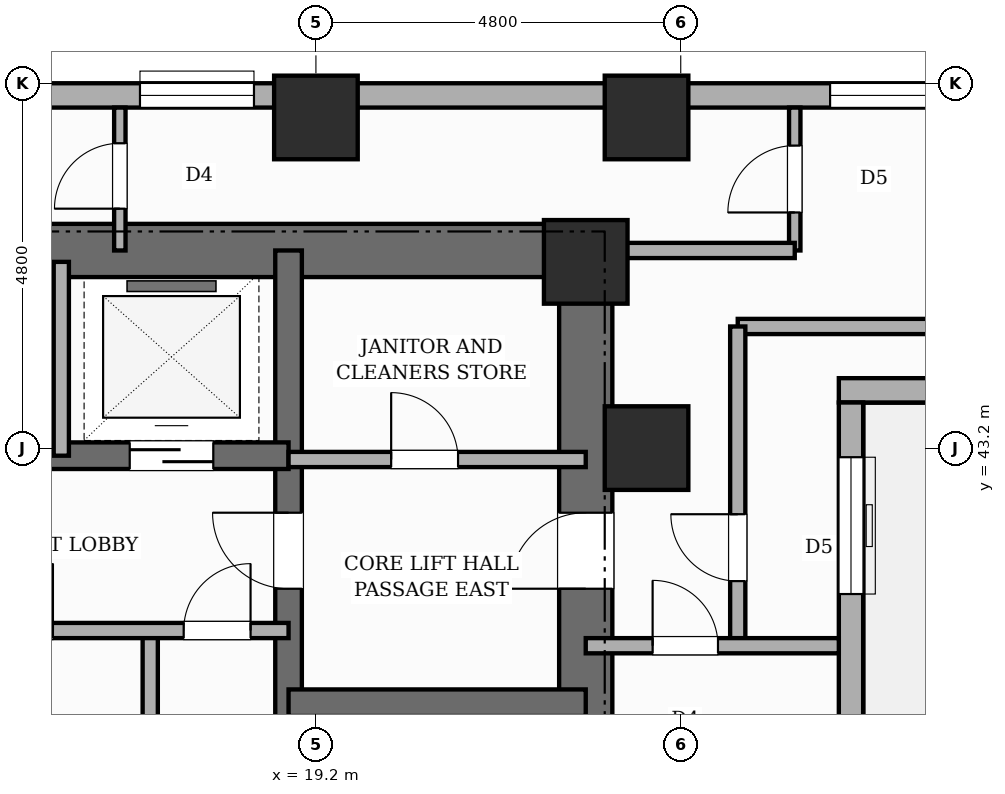
"""IFC4 building model, lengths in metres.
Left out: names, types, materials, properties, quantities, classifications, styles, units other than length and angle.
Written with IfcOpenShell. Run it as: python <this file> out.ifc"""

import sys

from ifc_helpers import new_model, si_unit, direction, frame, frame_2d, origin, origin_2d, place, context, subcontext, project, spatial, rectangle, extrude, element, fill, save


model = new_model("IFC4")
c1 = context("Model", 3, precision=1e-05, world=origin(), true_north=direction((0.0, 1.0)))
c2 = subcontext(c1, "Body", "Model", "MODEL_VIEW")
j1 = project(units=[si_unit("LENGTHUNIT", "METRE"), si_unit("PLANEANGLEUNIT", "RADIAN")], contexts=[c1])
p1 = place(None, origin())
s1 = spatial("IfcSite", under=j1, at=p1, CompositionType="ELEMENT")
p2 = place(p1, origin())
s2 = spatial("IfcBuilding", under=s1, at=p2, CompositionType="ELEMENT")
p3 = place(p2, frame((0.0, 0.0, 97.0)))
s3 = spatial("IfcBuildingStorey", under=s2, at=p3, CompositionType="ELEMENT", Elevation=97.0)
p4 = place(p3, frame((22.75, 30.55, 0.0), z_axis=(0.0, 0.0, 1.0), x_axis=(0.0, 1.0, 0.0)))
e1 = element("IfcWall", 1, at=p4, inside=s3, PredefinedType="SHEAR", context=c2, shape_type="SweptSolid", body=[
    extrude(rectangle(XDim=15.6, YDim=0.7, at=frame_2d((7.8, 0.0))), origin(), (0.0, 0.0, 1.0), 4.8),
])
p5 = place(p4, frame((10.8, 0.0, 0.0)))
e2 = element("IfcOpeningElement", 2, at=p5, cuts=e1, PredefinedType="OPENING", context=c2, shape_type="SweptSolid", body=[
    extrude(rectangle(XDim=1.0, YDim=2.15, at=frame_2d((0.5, 1.075))), frame((0.0, 0.36, 0.0), z_axis=(0.0, -1.0, 0.0), x_axis=(1.0, 0.0, 0.0)), (0.0, 0.0, 1.0), 0.72),
])
p6 = place(p3, frame((6.05, 45.8, 0.0), z_axis=(0.0, 0.0, 1.0), x_axis=(1.0, 0.0, 0.0)))
e3 = element("IfcWall", 3, at=p6, inside=s3, PredefinedType="SHEAR", context=c2, shape_type="SweptSolid", body=[
    extrude(rectangle(XDim=16.7, YDim=0.7, at=frame_2d((8.35, 0.0))), origin(), (0.0, 0.0, 1.0), 4.8),
])
p7 = place(p3, frame((18.84, 30.9, 0.0), z_axis=(0.0, 0.0, 1.0), x_axis=(0.0, 1.0, 0.0)))
e4 = element("IfcWall", 4, at=p7, inside=s3, PredefinedType="SHEAR", context=c2, shape_type="SweptSolid", body=[
    extrude(rectangle(XDim=14.9, YDim=0.35, at=frame_2d((7.45, 0.0))), origin(), (0.0, 0.0, 1.0), 4.8),
])
p8 = place(p7, frame((0.65, 0.0, 0.0)))
e5 = element("IfcOpeningElement", 5, at=p8, cuts=e4, PredefinedType="OPENING", context=c2, shape_type="SweptSolid", body=[
    extrude(rectangle(XDim=0.95, YDim=2.1, at=frame_2d((0.475, 1.05))), frame((0.0, 0.185, 0.0), z_axis=(0.0, -1.0, 0.0), x_axis=(1.0, 0.0, 0.0)), (0.0, 0.0, 1.0), 0.37),
])
p9 = place(p7, frame((10.45, 0.0, 0.0)))
e6 = element("IfcOpeningElement", 6, at=p9, cuts=e4, PredefinedType="OPENING", context=c2, shape_type="SweptSolid", body=[
    extrude(rectangle(XDim=1.0, YDim=2.15, at=frame_2d((0.5, 1.075))), frame((0.0, 0.185, 0.0), z_axis=(0.0, -1.0, 0.0), x_axis=(1.0, 0.0, 0.0)), (0.0, 0.0, 1.0), 0.37),
])
p10 = place(p3, frame((18.84, 39.85, 0.0), z_axis=(0.0, 0.0, 1.0), x_axis=(1.0, 0.0, 0.0)))
e7 = element("IfcWall", 7, at=p10, inside=s3, PredefinedType="SHEAR", context=c2, shape_type="SweptSolid", body=[
    extrude(rectangle(XDim=3.91, YDim=0.35, at=frame_2d((1.955, 0.0))), origin(), (0.0, 0.0, 1.0), 4.8),
])
p11 = place(p3, frame((9.96, 43.1, 0.0), z_axis=(0.0, 0.0, 1.0), x_axis=(1.0, 0.0, 0.0)))
e8 = element("IfcWall", 8, at=p11, inside=s3, PredefinedType="SHEAR", context=c2, shape_type="SweptSolid", body=[
    extrude(rectangle(XDim=8.88, YDim=0.35, at=frame_2d((4.44, 0.0))), origin(), (0.0, 0.0, 1.0), 4.8),
])
p12 = place(p11, frame((0.99, 0.0, 0.0)))
e9 = element("IfcOpeningElement", 9, at=p12, cuts=e8, PredefinedType="OPENING", context=c2, shape_type="SweptSolid", body=[
    extrude(rectangle(XDim=1.1, YDim=2.15, at=frame_2d((0.55, 1.075))), frame((0.0, 0.185, 0.0), z_axis=(0.0, -1.0, 0.0), x_axis=(1.0, 0.0, 0.0)), (0.0, 0.0, 1.0), 0.37),
])
p13 = place(p11, frame((3.89, 0.0, 0.0)))
e10 = element("IfcOpeningElement", 10, at=p13, cuts=e8, PredefinedType="OPENING", context=c2, shape_type="SweptSolid", body=[
    extrude(rectangle(XDim=1.1, YDim=2.15, at=frame_2d((0.55, 1.075))), frame((0.0, 0.185, 0.0), z_axis=(0.0, -1.0, 0.0), x_axis=(1.0, 0.0, 0.0)), (0.0, 0.0, 1.0), 0.37),
])
p14 = place(p11, frame((6.79, 0.0, 0.0)))
e11 = element("IfcOpeningElement", 11, at=p14, cuts=e8, PredefinedType="OPENING", context=c2, shape_type="SweptSolid", body=[
    extrude(rectangle(XDim=1.1, YDim=2.15, at=frame_2d((0.55, 1.075))), frame((0.0, 0.185, 0.0), z_axis=(0.0, -1.0, 0.0), x_axis=(1.0, 0.0, 0.0)), (0.0, 0.0, 1.0), 0.37),
])
for number, where, z_axis, x_axis in (
    (12, (19.2, 47.55, 0.0), (0.0, 0.0, 1.0), (1.0, 0.0, 0.0)),
    (13, (22.75, 45.65, 0.0), (0.0, 0.0, 1.0), (1.0, 0.0, 0.0)),
    (14, (23.55, 43.2, 0.0), (0.0, 0.0, 1.0), (1.0, 0.0, 0.0)),
    (15, (23.55, 47.55, 0.0), (0.0, 0.0, 1.0), (1.0, 0.0, 0.0)),
):
    element("IfcColumn", number, at=place(p3, frame(where, z_axis=z_axis, x_axis=x_axis)), inside=s3, PredefinedType="COLUMN", context=c2, shape_type="SweptSolid", body=[
        extrude(rectangle(XDim=1.1, YDim=1.1, at=origin_2d()), origin(), (0.0, 0.0, 1.0), 4.8),
    ])
p15 = place(p3, frame((7.2, 47.84, 0.0), z_axis=(0.0, 0.0, 1.0), x_axis=(1.0, 0.0, 0.0)))
e16 = element("IfcWall", 16, at=p15, inside=s3, PredefinedType="STANDARD", context=c2, shape_type="SweptSolid", body=[
    extrude(rectangle(XDim=43.2, YDim=0.32, at=frame_2d((21.6, 0.0))), origin(), (0.0, 0.0, 1.0), 3.68),
])
p16 = place(p15, frame((18.765, 0.0, 0.8)))
e17 = element("IfcOpeningElement", 17, at=p16, cuts=e16, PredefinedType="OPENING", context=c2, shape_type="SweptSolid", body=[
    extrude(rectangle(XDim=1.8, YDim=2.1, at=frame_2d((0.9, 1.05))), frame((0.0, 0.17, 0.0), z_axis=(0.0, -1.0, 0.0), x_axis=(1.0, 0.0, 0.0)), (0.0, 0.0, 1.0), 0.34),
])
p17 = place(p15, frame((0.345, 0.0, 0.8)))
e18 = element("IfcOpeningElement", 18, at=p17, cuts=e16, PredefinedType="OPENING", context=c2, shape_type="SweptSolid", body=[
    extrude(rectangle(XDim=1.2, YDim=1.8, at=frame_2d((0.6, 0.9))), frame((0.0, 0.17, 0.0), z_axis=(0.0, -1.0, 0.0), x_axis=(1.0, 0.0, 0.0)), (0.0, 0.0, 1.0), 0.34),
])
p18 = place(p15, frame((9.685, 0.0, 0.8)))
e19 = element("IfcOpeningElement", 19, at=p18, cuts=e16, PredefinedType="OPENING", context=c2, shape_type="SweptSolid", body=[
    extrude(rectangle(XDim=1.5, YDim=2.1, at=frame_2d((0.75, 1.05))), frame((0.0, 0.17, 0.0), z_axis=(0.0, -1.0, 0.0), x_axis=(1.0, 0.0, 0.0)), (0.0, 0.0, 1.0), 0.34),
])
p19 = place(p3, frame((30.04, 43.96, 0.0), z_axis=(0.0, 0.0, 1.0), x_axis=(-1.0, 0.0, 0.0)))
e20 = element("IfcWall", 20, at=p19, inside=s3, PredefinedType="STANDARD", context=c2, shape_type="SweptSolid", body=[
    extrude(rectangle(XDim=3.96, YDim=0.32, at=frame_2d((1.98, 0.0))), origin(), (0.0, 0.0, 1.0), 4.5),
])
p20 = place(p3, frame((26.24, 43.8, 0.0), z_axis=(0.0, 0.0, 1.0), x_axis=(0.0, -1.0, 0.0)))
e21 = element("IfcWall", 21, at=p20, inside=s3, PredefinedType="STANDARD", context=c2, shape_type="SweptSolid", body=[
    extrude(rectangle(XDim=15.0, YDim=0.32, at=frame_2d((7.5, 0.0))), origin(), (0.0, 0.0, 1.0), 4.5),
])
p21 = place(p20, frame((8.15, 0.0, 0.0)))
e22 = element("IfcOpeningElement", 22, at=p21, cuts=e21, PredefinedType="OPENING", context=c2, shape_type="SweptSolid", body=[
    extrude(rectangle(XDim=1.3, YDim=2.2, at=frame_2d((0.65, 1.1))), frame((0.0, 0.17, 0.0), z_axis=(0.0, -1.0, 0.0), x_axis=(1.0, 0.0, 0.0)), (0.0, 0.0, 1.0), 0.34),
])
p22 = place(p20, frame((0.72, 0.0, 0.8)))
e23 = element("IfcOpeningElement", 23, at=p22, cuts=e21, PredefinedType="OPENING", context=c2, shape_type="SweptSolid", body=[
    extrude(rectangle(XDim=1.8, YDim=2.1, at=frame_2d((0.9, 1.05))), frame((0.0, 0.17, 0.0), z_axis=(0.0, -1.0, 0.0), x_axis=(1.0, 0.0, 0.0)), (0.0, 0.0, 1.0), 0.34),
])
p23 = place(p20, frame((4.735, 0.0, 0.8)))
e24 = element("IfcOpeningElement", 24, at=p23, cuts=e21, PredefinedType="OPENING", context=c2, shape_type="SweptSolid", body=[
    extrude(rectangle(XDim=1.8, YDim=2.1, at=frame_2d((0.9, 1.05))), frame((0.0, 0.17, 0.0), z_axis=(0.0, -1.0, 0.0), x_axis=(1.0, 0.0, 0.0)), (0.0, 0.0, 1.0), 0.34),
])
p24 = place(p3, frame((17.02, 35.65, 0.0), z_axis=(0.0, 0.0, 1.0), x_axis=(0.0, 1.0, 0.0)))
e25 = element("IfcWall", 25, at=p24, inside=s3, PredefinedType="POLYGONAL", context=c2, shape_type="SweptSolid", body=[
    extrude(rectangle(XDim=5.15, YDim=0.2, at=frame_2d((2.575, 0.0))), origin(), (0.0, 0.0, 1.0), 4.5),
])
p25 = place(p3, frame((9.96, 40.8, 0.0), z_axis=(0.0, 0.0, 1.0), x_axis=(1.0, 0.0, 0.0)))
e26 = element("IfcWall", 26, at=p25, inside=s3, PredefinedType="POLYGONAL", context=c2, shape_type="SweptSolid", body=[
    extrude(rectangle(XDim=8.88, YDim=0.2, at=frame_2d((4.44, 0.0))), origin(), (0.0, 0.0, 1.0), 4.5),
])
p26 = place(p25, frame((7.5, 0.0, 0.0)))
e27 = element("IfcOpeningElement", 27, at=p26, cuts=e26, PredefinedType="OPENING", context=c2, shape_type="SweptSolid", body=[
    extrude(rectangle(XDim=0.88, YDim=2.1, at=frame_2d((0.44, 1.05))), frame((0.0, 0.11, 0.0), z_axis=(0.0, -1.0, 0.0), x_axis=(1.0, 0.0, 0.0)), (0.0, 0.0, 1.0), 0.22),
])
p27 = place(p25, frame((1.7, 0.0, 0.0)))
e28 = element("IfcOpeningElement", 28, at=p27, cuts=e26, PredefinedType="OPENING", context=c2, shape_type="SweptSolid", body=[
    extrude(rectangle(XDim=0.88, YDim=2.1, at=frame_2d((0.44, 1.05))), frame((0.0, 0.11, 0.0), z_axis=(0.0, -1.0, 0.0), x_axis=(1.0, 0.0, 0.0)), (0.0, 0.0, 1.0), 0.22),
])
p28 = place(p25, frame((4.9, 0.0, 0.0)))
e29 = element("IfcOpeningElement", 29, at=p28, cuts=e26, PredefinedType="OPENING", context=c2, shape_type="SweptSolid", body=[
    extrude(rectangle(XDim=0.88, YDim=2.1, at=frame_2d((0.44, 1.05))), frame((0.0, 0.11, 0.0), z_axis=(0.0, -1.0, 0.0), x_axis=(1.0, 0.0, 0.0)), (0.0, 0.0, 1.0), 0.22),
])
p29 = place(p3, frame((18.84, 43.05, 0.0), z_axis=(0.0, 0.0, 1.0), x_axis=(1.0, 0.0, 0.0)))
e30 = element("IfcWall", 30, at=p29, inside=s3, PredefinedType="POLYGONAL", context=c2, shape_type="SweptSolid", body=[
    extrude(rectangle(XDim=3.91, YDim=0.2, at=frame_2d((1.955, 0.0))), origin(), (0.0, 0.0, 1.0), 3.68),
])
p30 = place(p29, frame((1.35, 0.0, 0.0)))
e31 = element("IfcOpeningElement", 31, at=p30, cuts=e30, PredefinedType="OPENING", context=c2, shape_type="SweptSolid", body=[
    extrude(rectangle(XDim=0.88, YDim=2.1, at=frame_2d((0.44, 1.05))), frame((0.0, 0.11, 0.0), z_axis=(0.0, -1.0, 0.0), x_axis=(1.0, 0.0, 0.0)), (0.0, 0.0, 1.0), 0.22),
])
p31 = place(p3, frame((15.85, 43.1, 0.0), z_axis=(0.0, 0.0, 1.0), x_axis=(0.0, 1.0, 0.0)))
e32 = element("IfcWall", 32, at=p31, inside=s3, PredefinedType="POLYGONAL", context=c2, shape_type="SweptSolid", body=[
    extrude(rectangle(XDim=2.55, YDim=0.2, at=frame_2d((1.275, 0.0))), origin(), (0.0, 0.0, 1.0), 4.5),
])
p32 = place(p3, frame((25.5, 45.8, 0.0), z_axis=(0.0, 0.0, 1.0), x_axis=(0.0, 1.0, 0.0)))
e33 = element("IfcWall", 33, at=p32, inside=s3, PredefinedType="PARTITIONING", context=c2, shape_type="SweptSolid", body=[
    extrude(rectangle(XDim=1.88, YDim=0.15, at=frame_2d((0.94, 0.0))), origin(), (0.0, 0.0, 1.0), 4.5),
])
p33 = place(p32, frame((0.5, 0.0, 0.0)))
e34 = element("IfcOpeningElement", 34, at=p33, cuts=e33, PredefinedType="OPENING", context=c2, shape_type="SweptSolid", body=[
    extrude(rectangle(XDim=0.88, YDim=2.1, at=frame_2d((0.44, 1.05))), frame((0.0, 0.085, 0.0), z_axis=(0.0, -1.0, 0.0), x_axis=(1.0, 0.0, 0.0)), (0.0, 0.0, 1.0), 0.17),
])
p34 = place(p3, frame((16.62, 45.8, 0.0), z_axis=(0.0, 0.0, 1.0), x_axis=(0.0, 1.0, 0.0)))
e35 = element("IfcWall", 35, at=p34, inside=s3, PredefinedType="PARTITIONING", context=c2, shape_type="SweptSolid", body=[
    extrude(rectangle(XDim=1.88, YDim=0.15, at=frame_2d((0.94, 0.0))), origin(), (0.0, 0.0, 1.0), 4.5),
])
p35 = place(p34, frame((0.55, 0.0, 0.0)))
e36 = element("IfcOpeningElement", 36, at=p35, cuts=e35, PredefinedType="OPENING", context=c2, shape_type="SweptSolid", body=[
    extrude(rectangle(XDim=0.86, YDim=2.1, at=frame_2d((0.43, 1.05))), frame((0.0, 0.085, 0.0), z_axis=(0.0, -1.0, 0.0), x_axis=(1.0, 0.0, 0.0)), (0.0, 0.0, 1.0), 0.17),
])
p36 = place(p3, frame((22.75, 45.8, 0.0), z_axis=(0.0, 0.0, 1.0), x_axis=(1.0, 0.0, 0.0)))
e37 = element("IfcWall", 37, at=p36, inside=s3, PredefinedType="PARTITIONING", context=c2, shape_type="SweptSolid", body=[
    extrude(rectangle(XDim=2.75, YDim=0.2, at=frame_2d((1.375, 0.0))), origin(), (0.0, 0.0, 1.0), 4.5),
])
p37 = place(p3, frame((24.75, 44.8, 0.0), z_axis=(0.0, 0.0, 1.0), x_axis=(1.0, 0.0, 0.0)))
e38 = element("IfcWall", 38, at=p37, inside=s3, PredefinedType="PARTITIONING", context=c2, shape_type="SweptSolid", body=[
    extrude(rectangle(XDim=17.03, YDim=0.2, at=frame_2d((8.515, 0.0))), origin(), (0.0, 0.0, 1.0), 4.5),
])
p38 = place(p37, frame((14.55, 0.0, 0.0)))
e39 = element("IfcOpeningElement", 39, at=p38, cuts=e38, PredefinedType="OPENING", context=c2, shape_type="SweptSolid", body=[
    extrude(rectangle(XDim=0.95, YDim=2.15, at=frame_2d((0.475, 1.075))), frame((0.0, 0.11, 0.0), z_axis=(0.0, -1.0, 0.0), x_axis=(1.0, 0.0, 0.0)), (0.0, 0.0, 1.0), 0.22),
])
p39 = place(p3, frame((24.75, 40.6, 0.0), z_axis=(0.0, 0.0, 1.0), x_axis=(0.0, 1.0, 0.0)))
e40 = element("IfcWall", 40, at=p39, inside=s3, PredefinedType="PARTITIONING", context=c2, shape_type="SweptSolid", body=[
    extrude(rectangle(XDim=4.2, YDim=0.2, at=frame_2d((2.1, 0.0))), origin(), (0.0, 0.0, 1.0), 4.5),
])
p40 = place(p39, frame((0.85, 0.0, 0.0)))
e41 = element("IfcOpeningElement", 41, at=p40, cuts=e40, PredefinedType="OPENING", context=c2, shape_type="SweptSolid", body=[
    extrude(rectangle(XDim=0.88, YDim=2.1, at=frame_2d((0.44, 1.05))), frame((0.0, 0.11, 0.0), z_axis=(0.0, -1.0, 0.0), x_axis=(1.0, 0.0, 0.0)), (0.0, 0.0, 1.0), 0.22),
])
p41 = place(p3, frame((22.75, 40.6, 0.0), z_axis=(0.0, 0.0, 1.0), x_axis=(1.0, 0.0, 0.0)))
e42 = element("IfcWall", 42, at=p41, inside=s3, PredefinedType="PARTITIONING", context=c2, shape_type="SweptSolid", body=[
    extrude(rectangle(XDim=3.33, YDim=0.2, at=frame_2d((1.665, 0.0))), origin(), (0.0, 0.0, 1.0), 4.5),
])
p42 = place(p41, frame((0.88, 0.0, 0.0)))
e43 = element("IfcOpeningElement", 43, at=p42, cuts=e42, PredefinedType="OPENING", context=c2, shape_type="SweptSolid", body=[
    extrude(rectangle(XDim=0.86, YDim=2.1, at=frame_2d((0.43, 1.05))), frame((0.0, 0.11, 0.0), z_axis=(0.0, -1.0, 0.0), x_axis=(1.0, 0.0, 0.0)), (0.0, 0.0, 1.0), 0.22),
])
p43 = place(p16, origin())
e44 = element("IfcWindow", 44, at=p43, inside=s3, PartitioningType="SINGLE_PANEL", PredefinedType="WINDOW", context=c2, shape_type="SweptSolid", body=[
    extrude(rectangle(XDim=1.8, YDim=2.1, at=frame_2d((0.9, 1.05))), frame((0.0, 0.03, 0.0), z_axis=(0.0, -1.0, 0.0), x_axis=(1.0, 0.0, 0.0)), (0.0, 0.0, 1.0), 0.06),
])
fill(e17, e44)
p44 = place(p18, origin())
e45 = element("IfcWindow", 45, at=p44, inside=s3, PartitioningType="SINGLE_PANEL", PredefinedType="WINDOW", context=c2, shape_type="SweptSolid", body=[
    extrude(rectangle(XDim=1.5, YDim=2.1, at=frame_2d((0.75, 1.05))), frame((0.0, 0.03, 0.0), z_axis=(0.0, -1.0, 0.0), x_axis=(1.0, 0.0, 0.0)), (0.0, 0.0, 1.0), 0.06),
])
fill(e19, e45)
p45 = place(p22, origin())
e46 = element("IfcWindow", 46, at=p45, inside=s3, PartitioningType="SINGLE_PANEL", PredefinedType="WINDOW", context=c2, shape_type="SweptSolid", body=[
    extrude(rectangle(XDim=1.8, YDim=2.1, at=frame_2d((0.9, 1.05))), frame((0.0, 0.03, 0.0), z_axis=(0.0, -1.0, 0.0), x_axis=(1.0, 0.0, 0.0)), (0.0, 0.0, 1.0), 0.06),
])
fill(e23, e46)
p46 = place(p26, origin())
e47 = element("IfcDoor", 47, at=p46, inside=s3, OperationType="SINGLE_SWING_RIGHT", PredefinedType="DOOR", context=c2, shape_type="SweptSolid", body=[
    extrude(rectangle(XDim=0.88, YDim=2.1, at=frame_2d((0.44, 1.05))), frame((0.0, 0.025, 0.0), z_axis=(0.0, -1.0, 0.0), x_axis=(1.0, 0.0, 0.0)), (0.0, 0.0, 1.0), 0.05),
])
fill(e27, e47)
p47 = place(p14, origin())
e48 = element("IfcDoor", 48, at=p47, inside=s3, OperationType="SLIDING_TO_LEFT", PredefinedType="DOOR", context=c2, shape_type="SweptSolid", body=[
    extrude(rectangle(XDim=1.1, YDim=2.15, at=frame_2d((0.55, 1.075))), frame((0.0, 0.025, 0.0), z_axis=(0.0, -1.0, 0.0), x_axis=(1.0, 0.0, 0.0)), (0.0, 0.0, 1.0), 0.05),
])
fill(e11, e48)
p48 = place(p9, origin())
e49 = element("IfcDoor", 49, at=p48, inside=s3, OperationType="SINGLE_SWING_RIGHT", PredefinedType="DOOR", context=c2, shape_type="SweptSolid", body=[
    extrude(rectangle(XDim=1.0, YDim=2.15, at=frame_2d((0.5, 1.075))), frame((0.0, 0.025, 0.0), z_axis=(0.0, -1.0, 0.0), x_axis=(1.0, 0.0, 0.0)), (0.0, 0.0, 1.0), 0.05),
])
fill(e6, e49)
p49 = place(p5, origin())
e50 = element("IfcDoor", 50, at=p49, inside=s3, OperationType="SINGLE_SWING_LEFT", PredefinedType="DOOR", context=c2, shape_type="SweptSolid", body=[
    extrude(rectangle(XDim=1.0, YDim=2.15, at=frame_2d((0.5, 1.075))), frame((0.0, 0.025, 0.0), z_axis=(0.0, -1.0, 0.0), x_axis=(1.0, 0.0, 0.0)), (0.0, 0.0, 1.0), 0.05),
])
fill(e2, e50)
p50 = place(p28, origin())
e51 = element("IfcDoor", 51, at=p50, inside=s3, OperationType="SINGLE_SWING_RIGHT", PredefinedType="DOOR", context=c2, shape_type="SweptSolid", body=[
    extrude(rectangle(XDim=0.88, YDim=2.1, at=frame_2d((0.44, 1.05))), frame((0.0, 0.025, 0.0), z_axis=(0.0, -1.0, 0.0), x_axis=(1.0, 0.0, 0.0)), (0.0, 0.0, 1.0), 0.05),
])
fill(e29, e51)
p51 = place(p30, origin())
e52 = element("IfcDoor", 52, at=p51, inside=s3, OperationType="SINGLE_SWING_LEFT", PredefinedType="DOOR", context=c2, shape_type="SweptSolid", body=[
    extrude(rectangle(XDim=0.88, YDim=2.1, at=frame_2d((0.44, 1.05))), frame((0.0, 0.025, 0.0), z_axis=(0.0, -1.0, 0.0), x_axis=(1.0, 0.0, 0.0)), (0.0, 0.0, 1.0), 0.05),
])
fill(e31, e52)
p52 = place(p33, origin())
e53 = element("IfcDoor", 53, at=p52, inside=s3, OperationType="SINGLE_SWING_LEFT", PredefinedType="DOOR", context=c2, shape_type="SweptSolid", body=[
    extrude(rectangle(XDim=0.88, YDim=2.1, at=frame_2d((0.44, 1.05))), frame((0.0, 0.025, 0.0), z_axis=(0.0, -1.0, 0.0), x_axis=(1.0, 0.0, 0.0)), (0.0, 0.0, 1.0), 0.05),
])
fill(e34, e53)
p53 = place(p35, origin())
e54 = element("IfcDoor", 54, at=p53, inside=s3, OperationType="SINGLE_SWING_LEFT", PredefinedType="DOOR", context=c2, shape_type="SweptSolid", body=[
    extrude(rectangle(XDim=0.86, YDim=2.1, at=frame_2d((0.43, 1.05))), frame((0.0, 0.025, 0.0), z_axis=(0.0, -1.0, 0.0), x_axis=(1.0, 0.0, 0.0)), (0.0, 0.0, 1.0), 0.05),
])
fill(e36, e54)
p54 = place(p40, origin())
e55 = element("IfcDoor", 55, at=p54, inside=s3, OperationType="SINGLE_SWING_RIGHT", PredefinedType="DOOR", context=c2, shape_type="SweptSolid", body=[
    extrude(rectangle(XDim=0.88, YDim=2.1, at=frame_2d((0.44, 1.05))), frame((0.0, 0.025, 0.0), z_axis=(0.0, -1.0, 0.0), x_axis=(1.0, 0.0, 0.0)), (0.0, 0.0, 1.0), 0.05),
])
fill(e41, e55)
p55 = place(p42, origin())
e56 = element("IfcDoor", 56, at=p55, inside=s3, OperationType="SINGLE_SWING_LEFT", PredefinedType="DOOR", context=c2, shape_type="SweptSolid", body=[
    extrude(rectangle(XDim=0.86, YDim=2.1, at=frame_2d((0.43, 1.05))), frame((0.0, 0.025, 0.0), z_axis=(0.0, -1.0, 0.0), x_axis=(1.0, 0.0, 0.0)), (0.0, 0.0, 1.0), 0.05),
])
fill(e43, e56)
save(model, sys.argv[1])
